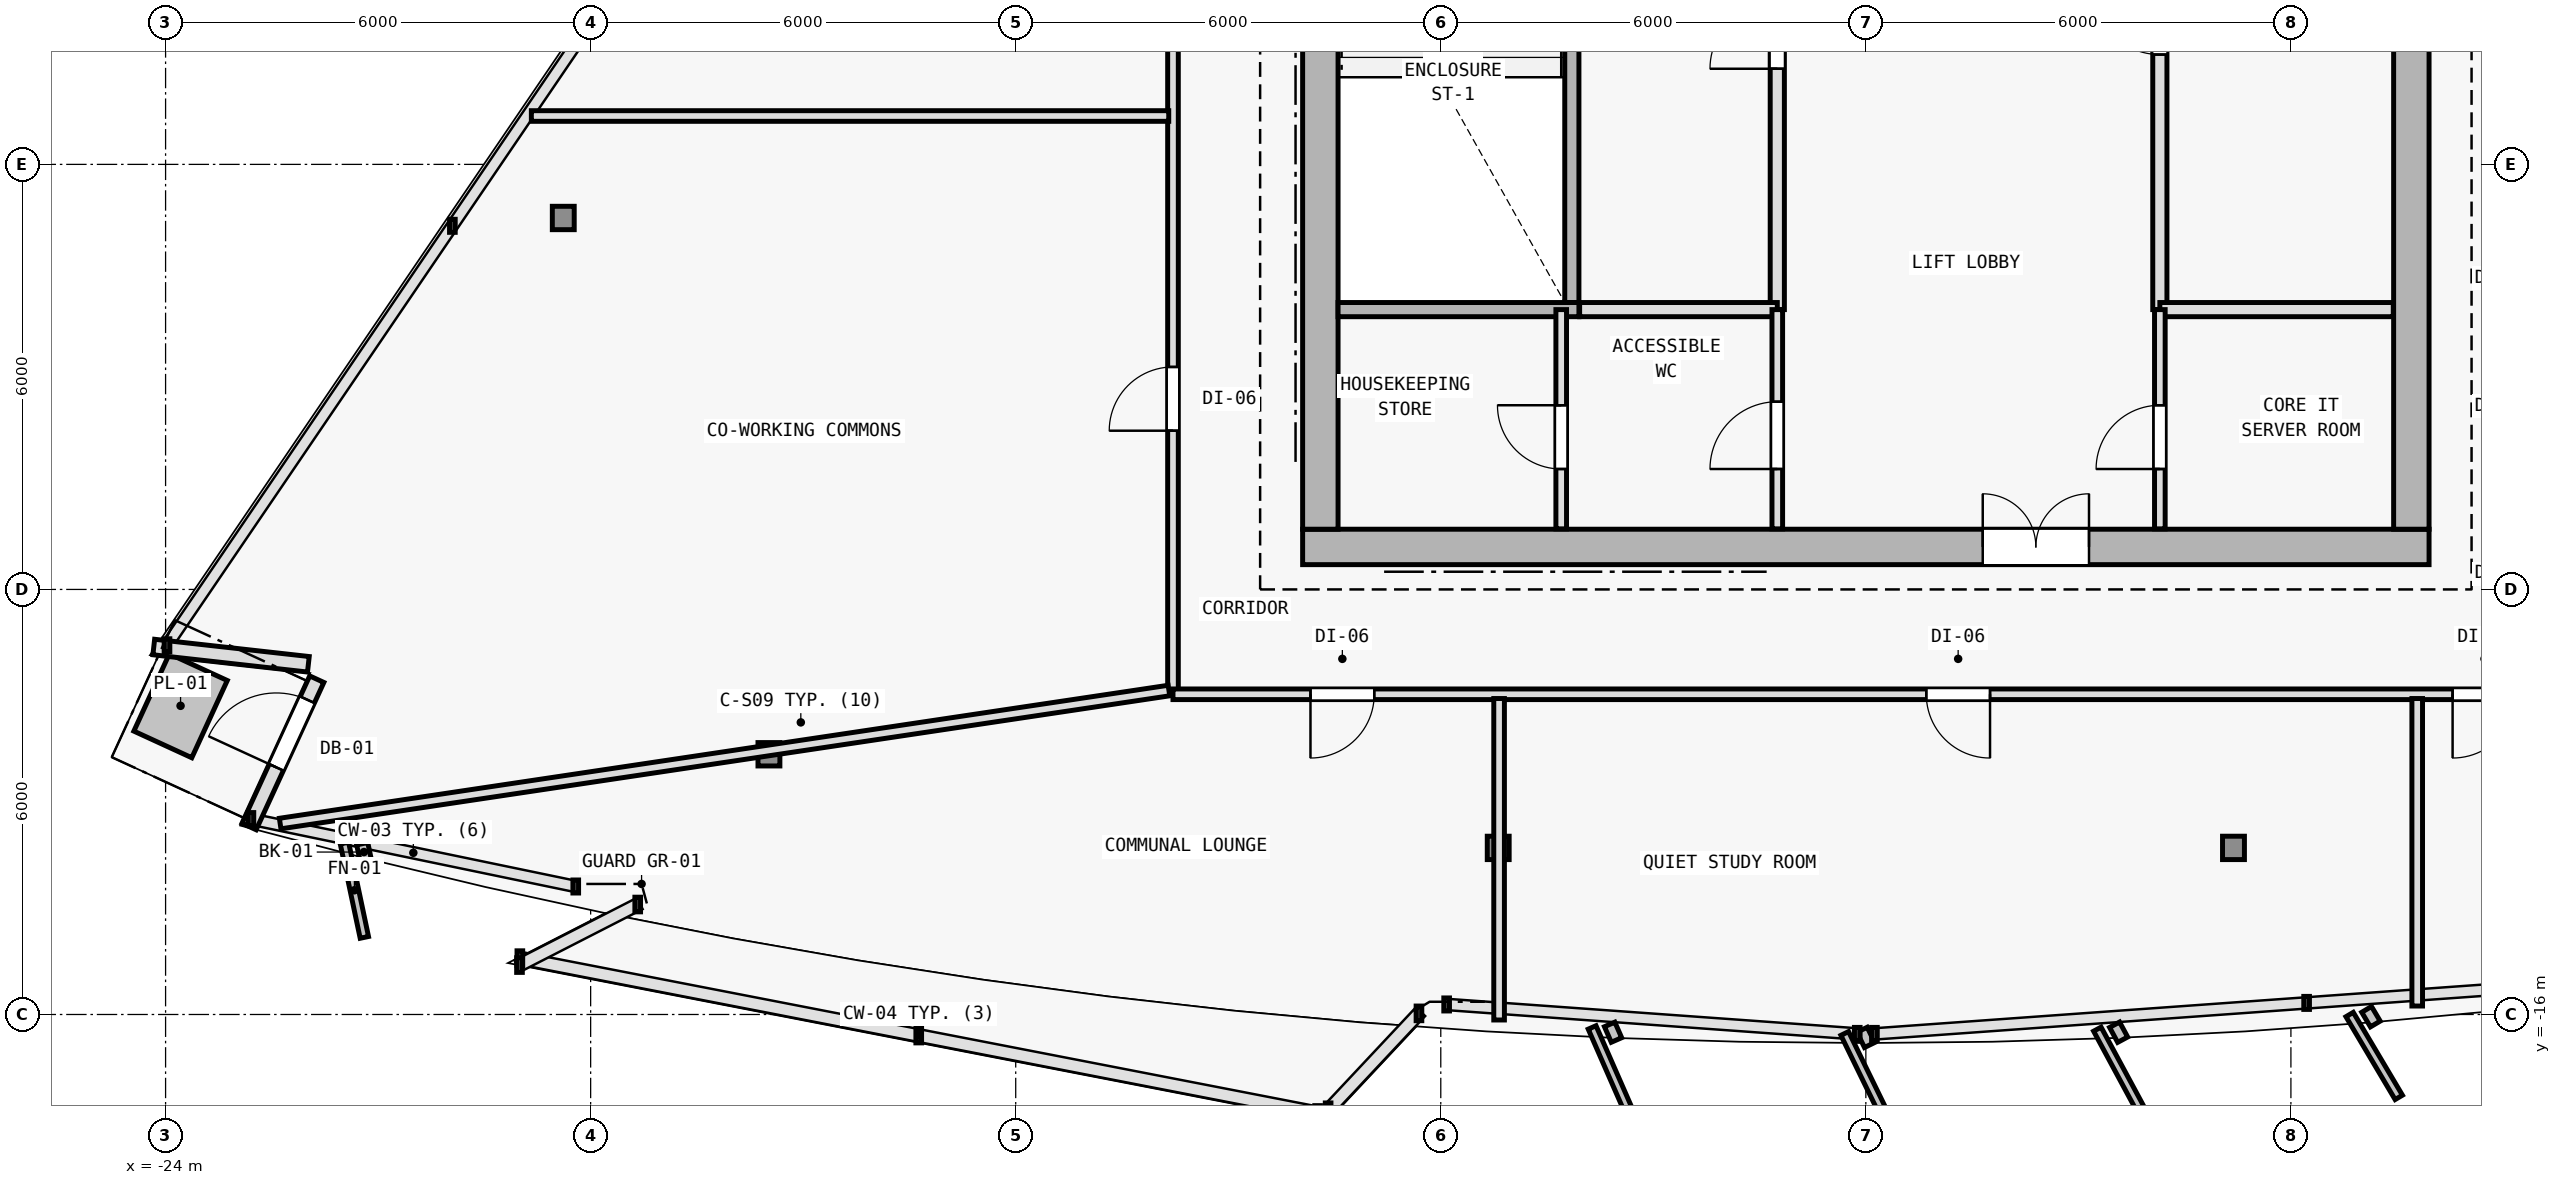
"""IFC4 building model, lengths in metres.
Left out: names, types, materials, properties, quantities, classifications, styles, units other than length and angle.
Written with IfcOpenShell. Run it as: python <this file> out.ifc"""

import sys

from ifc_helpers import new_model, si_unit, direction, frame, frame_2d, origin, origin_2d, place, context, subcontext, project, spatial, rectangle, i_section, extrude, element, fill, save


model = new_model("IFC4")
c1 = context("Model", 3, precision=1e-05, world=origin(), true_north=direction((0.0, 1.0)))
c2 = subcontext(c1, "Body", "Model", "MODEL_VIEW")
j1 = project(units=[si_unit("LENGTHUNIT", "METRE"), si_unit("PLANEANGLEUNIT", "RADIAN")], contexts=[c1])
p1 = place(None, origin())
s1 = spatial("IfcSite", under=j1, at=p1, CompositionType="ELEMENT")
p2 = place(p1, origin())
s2 = spatial("IfcBuilding", under=s1, at=p2, CompositionType="ELEMENT")
p3 = place(p2, frame((0.0, 0.0, 272.4)))
s3 = spatial("IfcBuildingStorey", under=s2, at=p3, CompositionType="ELEMENT", Elevation=272.4)
for number, where, z_axis, x_axis in (
    (1, (-7.7, -9.4, 0.0), (0.0, 0.0, 1.0), (1.0, 0.0, 0.0)),
    (2, (7.7, -9.4, 0.0), (0.0, 0.0, 1.0), (1.0, 0.0, 0.0)),
    (3, (0.0, -9.4, 0.0), (0.0, 0.0, 1.0), (1.0, 0.0, 0.0)),
):
    element("IfcColumn", number, at=place(p3, frame(where, z_axis=z_axis, x_axis=x_axis)), inside=s3, PredefinedType="COLUMN", context=c2, shape_type="SweptSolid", body=[
        extrude(i_section(OverallWidth=0.374, OverallDepth=0.372, WebThickness=0.012, FlangeThickness=0.02, FilletRadius=0.015, at=origin_2d()), origin(), (0.0, 0.0, 1.0), 3.6),
    ])
p4 = place(p3, frame((-15.483, -12.327, 0.006), z_axis=(0.020596292833, 0.033511459955, 0.999226087917), x_axis=(-0.851954850327, 0.523615252838, 0.0)))
e4 = element("IfcColumn", 4, at=p4, inside=s3, PredefinedType="COLUMN", context=c2, shape_type="SweptSolid", body=[
    extrude(i_section(OverallWidth=0.309, OverallDepth=0.33, WebThickness=0.011, FlangeThickness=0.019, FilletRadius=0.027, at=origin_2d()), origin(), (0.0, 0.0, 1.0), 3.592),
])
for number, where, z_axis, x_axis in (
    (5, (-5.189, -13.648, 0.006), (0.007, 0.035, 0.999), (-0.982, 0.191, 0.0)),
    (6, (5.189, -13.648, 0.006), (-0.007, 0.035, 0.999), (-0.982, -0.191, 0.0)),
):
    element("IfcColumn", number, at=place(p3, frame(where, z_axis=z_axis, x_axis=x_axis)), inside=s3, PredefinedType="COLUMN", context=c2, shape_type="SweptSolid", body=[
        extrude(i_section(OverallWidth=0.309, OverallDepth=0.33, WebThickness=0.011, FlangeThickness=0.019, FilletRadius=0.027, at=origin_2d()), origin(), (0.0, 0.0, 1.0), 3.591),
    ])
p5 = place(p3, frame((-18.386, -4.757, 0.006), z_axis=(0.025224163578, 0.021620711639, 0.999447990843), x_axis=(-0.650791373456, 0.759256602365, 0.0)))
e7 = element("IfcColumn", 7, at=p5, inside=s3, PredefinedType="COLUMN", context=c2, shape_type="SweptSolid", body=[
    extrude(i_section(OverallWidth=0.309, OverallDepth=0.33, WebThickness=0.011, FlangeThickness=0.019, FilletRadius=0.027, at=origin_2d()), origin(), (0.0, 0.0, 1.0), 3.591),
])
p6 = place(p3, frame((-21.985, -11.057, 0.0), z_axis=(0.0, 0.0, 1.0), x_axis=(-0.993823926228, 0.110968480463, 0.0)))
e8 = element("IfcWall", 8, at=p6, inside=s3, PredefinedType="SOLIDWALL", context=c2, shape_type="SweptSolid", body=[
    extrude(rectangle(XDim=2.196, YDim=0.22, at=frame_2d((1.098, 0.0))), origin(), (0.0, 0.0, 1.0), 3.35),
])
p7 = place(p3, frame((-22.822, -13.347, 0.0), z_axis=(0.0, 0.0, 1.0), x_axis=(0.417447808253, 0.908700900949, 0.0)))
e9 = element("IfcWall", 9, at=p7, inside=s3, PredefinedType="SOLIDWALL", context=c2, shape_type="SweptSolid", body=[
    extrude(rectangle(XDim=2.289, YDim=0.22, at=frame_2d((1.145, 0.0))), origin(), (0.0, 0.0, 1.0), 3.35),
])
p8 = place(p7, frame((0.919, 0.0, 0.0)))
e10 = element("IfcOpeningElement", 10, at=p8, cuts=e9, PredefinedType="OPENING", context=c2, shape_type="SweptSolid", body=[
    extrude(rectangle(XDim=1.05, YDim=2.15, at=frame_2d((0.525, 1.075))), frame((0.0, 0.12, 0.0), z_axis=(0.0, -1.0, 0.0), x_axis=(1.0, 0.0, 0.0)), (0.0, 0.0, 1.0), 0.24),
])
p9 = place(p3, frame((-7.95, -9.4, 0.0), z_axis=(0.0, 0.0, 1.0), x_axis=(1.0, 0.0, 0.0)))
e11 = element("IfcWall", 11, at=p9, inside=s3, PredefinedType="SHEAR", context=c2, shape_type="SweptSolid", body=[
    extrude(rectangle(XDim=15.9, YDim=0.5, at=frame_2d((7.95, 0.0))), origin(), (0.0, 0.0, 1.0), 3.35),
])
p10 = place(p9, frame((9.6, 0.0, 0.0)))
e12 = element("IfcOpeningElement", 12, at=p10, cuts=e11, PredefinedType="OPENING", context=c2, shape_type="SweptSolid", body=[
    extrude(rectangle(XDim=1.5, YDim=2.2, at=frame_2d((0.75, 1.1))), frame((0.0, 0.26, 0.0), z_axis=(0.0, -1.0, 0.0), x_axis=(1.0, 0.0, 0.0)), (0.0, 0.0, 1.0), 0.52),
])
p11 = place(p3, frame((-7.7, -9.15, 0.0), z_axis=(0.0, 0.0, 1.0), x_axis=(0.0, 1.0, 0.0)))
e13 = element("IfcWall", 13, at=p11, inside=s3, PredefinedType="SHEAR", context=c2, shape_type="SweptSolid", body=[
    extrude(rectangle(XDim=19.1, YDim=0.5, at=frame_2d((9.55, 0.0))), origin(), (0.0, 0.0, 1.0), 3.35),
])
p12 = place(p11, frame((12.7, 0.0, 0.0)))
e14 = element("IfcOpeningElement", 14, at=p12, cuts=e13, PredefinedType="OPENING", context=c2, shape_type="SweptSolid", body=[
    extrude(rectangle(XDim=1.1, YDim=2.15, at=frame_2d((0.55, 1.075))), frame((0.0, 0.26, 0.0), z_axis=(0.0, -1.0, 0.0), x_axis=(1.0, 0.0, 0.0)), (0.0, 0.0, 1.0), 0.52),
])
p13 = place(p3, frame((7.7, 9.95, 0.0), z_axis=(0.0, 0.0, 1.0), x_axis=(0.0, -1.0, 0.0)))
e15 = element("IfcWall", 15, at=p13, inside=s3, PredefinedType="SHEAR", context=c2, shape_type="SweptSolid", body=[
    extrude(rectangle(XDim=19.1, YDim=0.5, at=frame_2d((9.55, 0.0))), origin(), (0.0, 0.0, 1.0), 3.35),
])
p14 = place(p3, frame((-4.15, -5.95, 0.0), z_axis=(0.0, 0.0, 1.0), x_axis=(0.0, 1.0, 0.0)))
e16 = element("IfcWall", 16, at=p14, inside=s3, PredefinedType="SOLIDWALL", context=c2, shape_type="SweptSolid", body=[
    extrude(rectangle(XDim=7.2, YDim=0.2, at=frame_2d((3.6, 0.0))), origin(), (0.0, 0.0, 1.0), 3.35),
])
p15 = place(p3, frame((4.15, -6.05, 0.0), z_axis=(0.0, 0.0, 1.0), x_axis=(0.0, 1.0, 0.0)))
e17 = element("IfcWall", 17, at=p15, inside=s3, PredefinedType="SOLIDWALL", context=c2, shape_type="SweptSolid", body=[
    extrude(rectangle(XDim=8.7, YDim=0.2, at=frame_2d((4.35, 0.0))), origin(), (0.0, 0.0, 1.0), 3.35),
])
p16 = place(p15, frame((3.6, 0.0, 0.0)))
e18 = element("IfcOpeningElement", 18, at=p16, cuts=e17, PredefinedType="OPENING", context=c2, shape_type="SweptSolid", body=[
    extrude(rectangle(XDim=0.95, YDim=2.1, at=frame_2d((0.475, 1.05))), frame((0.0, 0.11, 0.0), z_axis=(0.0, -1.0, 0.0), x_axis=(1.0, 0.0, 0.0)), (0.0, 0.0, 1.0), 0.22),
])
p17 = place(p3, frame((-1.25, -6.05, 0.0), z_axis=(0.0, 0.0, 1.0), x_axis=(0.0, 1.0, 0.0)))
e19 = element("IfcWall", 19, at=p17, inside=s3, PredefinedType="SOLIDWALL", context=c2, shape_type="SweptSolid", body=[
    extrude(rectangle(XDim=8.7, YDim=0.2, at=frame_2d((4.35, 0.0))), origin(), (0.0, 0.0, 1.0), 3.35),
])
p18 = place(p17, frame((3.4, 0.0, 0.0)))
e20 = element("IfcOpeningElement", 20, at=p18, cuts=e19, PredefinedType="OPENING", context=c2, shape_type="SweptSolid", body=[
    extrude(rectangle(XDim=0.95, YDim=2.1, at=frame_2d((0.475, 1.05))), frame((0.0, 0.11, 0.0), z_axis=(0.0, -1.0, 0.0), x_axis=(1.0, 0.0, 0.0)), (0.0, 0.0, 1.0), 0.22),
])
p19 = place(p3, frame((-7.45, -6.05, 0.0), z_axis=(0.0, 0.0, 1.0), x_axis=(1.0, 0.0, 0.0)))
e21 = element("IfcWall", 21, at=p19, inside=s3, PredefinedType="SOLIDWALL", context=c2, shape_type="SweptSolid", body=[
    extrude(rectangle(XDim=3.4, YDim=0.2, at=frame_2d((1.7, 0.0))), origin(), (0.0, 0.0, 1.0), 3.35),
])
p20 = place(p3, frame((-4.04, -6.05, 0.0), z_axis=(0.0, 0.0, 1.0), x_axis=(1.0, 0.0, 0.0)))
e22 = element("IfcWall", 22, at=p20, inside=s3, PredefinedType="SOLIDWALL", context=c2, shape_type="SweptSolid", body=[
    extrude(rectangle(XDim=2.79, YDim=0.2, at=frame_2d((1.395, 0.0))), origin(), (0.0, 0.0, 1.0), 3.35),
])
p21 = place(p3, frame((4.15, -6.05, 0.0), z_axis=(0.0, 0.0, 1.0), x_axis=(1.0, 0.0, 0.0)))
e23 = element("IfcWall", 23, at=p21, inside=s3, PredefinedType="SOLIDWALL", context=c2, shape_type="SweptSolid", body=[
    extrude(rectangle(XDim=3.295, YDim=0.2, at=frame_2d((1.647, 0.0))), origin(), (0.0, 0.0, 1.0), 3.35),
])
p22 = place(p3, frame((-1.25, -9.145, 0.0), z_axis=(0.0, 0.0, 1.0), x_axis=(0.0, 1.0, 0.0)))
e24 = element("IfcWall", 24, at=p22, inside=s3, PredefinedType="PARTITIONING", context=c2, shape_type="SweptSolid", body=[
    extrude(rectangle(XDim=3.095, YDim=0.15, at=frame_2d((1.547, 0.0))), origin(), (0.0, 0.0, 1.0), 3.35),
])
p23 = place(p22, frame((0.845, 0.0, 0.0)))
e25 = element("IfcOpeningElement", 25, at=p23, cuts=e24, PredefinedType="OPENING", context=c2, shape_type="SweptSolid", body=[
    extrude(rectangle(XDim=0.95, YDim=2.1, at=frame_2d((0.475, 1.05))), frame((0.0, 0.085, 0.0), z_axis=(0.0, -1.0, 0.0), x_axis=(1.0, 0.0, 0.0)), (0.0, 0.0, 1.0), 0.17),
])
p24 = place(p3, frame((4.15, -9.145, 0.0), z_axis=(0.0, 0.0, 1.0), x_axis=(0.0, 1.0, 0.0)))
e26 = element("IfcWall", 26, at=p24, inside=s3, PredefinedType="PARTITIONING", context=c2, shape_type="SweptSolid", body=[
    extrude(rectangle(XDim=3.095, YDim=0.15, at=frame_2d((1.547, 0.0))), origin(), (0.0, 0.0, 1.0), 3.35),
])
p25 = place(p24, frame((0.845, 0.0, 0.0)))
e27 = element("IfcOpeningElement", 27, at=p25, cuts=e26, PredefinedType="OPENING", context=c2, shape_type="SweptSolid", body=[
    extrude(rectangle(XDim=0.9, YDim=2.1, at=frame_2d((0.45, 1.05))), frame((0.0, 0.085, 0.0), z_axis=(0.0, -1.0, 0.0), x_axis=(1.0, 0.0, 0.0)), (0.0, 0.0, 1.0), 0.17),
])
p26 = place(p3, frame((-4.3, -9.145, 0.0), z_axis=(0.0, 0.0, 1.0), x_axis=(0.0, 1.0, 0.0)))
e28 = element("IfcWall", 28, at=p26, inside=s3, PredefinedType="PARTITIONING", context=c2, shape_type="SweptSolid", body=[
    extrude(rectangle(XDim=3.095, YDim=0.15, at=frame_2d((1.547, 0.0))), origin(), (0.0, 0.0, 1.0), 3.35),
])
p27 = place(p26, frame((0.845, 0.0, 0.0)))
e29 = element("IfcOpeningElement", 29, at=p27, cuts=e28, PredefinedType="OPENING", context=c2, shape_type="SweptSolid", body=[
    extrude(rectangle(XDim=0.9, YDim=2.1, at=frame_2d((0.45, 1.05))), frame((0.0, 0.085, 0.0), z_axis=(0.0, -1.0, 0.0), x_axis=(1.0, 0.0, 0.0)), (0.0, 0.0, 1.0), 0.17),
])
p28 = place(p3, frame((-9.78, -11.48, 0.0), z_axis=(0.0, 0.0, 1.0), x_axis=(0.0, 1.0, 0.0)))
e30 = element("IfcWall", 30, at=p28, inside=s3, PredefinedType="PARTITIONING", context=c2, shape_type="SweptSolid", body=[
    extrude(rectangle(XDim=19.706, YDim=0.15, at=frame_2d((9.853, 0.0))), origin(), (0.0, 0.0, 1.0), 2.725),
])
p29 = place(p28, frame((11.59, 0.0, 0.0)))
e31 = element("IfcOpeningElement", 31, at=p29, cuts=e30, PredefinedType="OPENING", context=c2, shape_type="SweptSolid", body=[
    extrude(rectangle(XDim=0.9, YDim=2.1, at=frame_2d((0.45, 1.05))), frame((0.0, 0.085, 0.0), z_axis=(0.0, -1.0, 0.0), x_axis=(1.0, 0.0, 0.0)), (0.0, 0.0, 1.0), 0.17),
])
p30 = place(p28, frame((3.721, 0.0, 0.0)))
e32 = element("IfcOpeningElement", 32, at=p30, cuts=e30, PredefinedType="OPENING", context=c2, shape_type="SweptSolid", body=[
    extrude(rectangle(XDim=0.9, YDim=2.1, at=frame_2d((0.45, 1.05))), frame((0.0, 0.085, 0.0), z_axis=(0.0, -1.0, 0.0), x_axis=(1.0, 0.0, 0.0)), (0.0, 0.0, 1.0), 0.17),
])
p31 = place(p3, frame((9.78, -11.48, 0.0), z_axis=(0.0, 0.0, 1.0), x_axis=(-1.0, 0.0, 0.0)))
e33 = element("IfcWall", 33, at=p31, inside=s3, PredefinedType="PARTITIONING", context=c2, shape_type="SweptSolid", body=[
    extrude(rectangle(XDim=19.56, YDim=0.15, at=frame_2d((9.78, 0.0))), origin(), (0.0, 0.0, 1.0), 2.775),
])
p32 = place(p31, frame((16.719, 0.0, 0.0)))
e34 = element("IfcOpeningElement", 34, at=p32, cuts=e33, PredefinedType="OPENING", context=c2, shape_type="SweptSolid", body=[
    extrude(rectangle(XDim=0.9, YDim=2.1, at=frame_2d((0.45, 1.05))), frame((0.0, 0.085, 0.0), z_axis=(0.0, -1.0, 0.0), x_axis=(1.0, 0.0, 0.0)), (0.0, 0.0, 1.0), 0.17),
])
p33 = place(p31, frame((8.027, 0.0, 0.0)))
e35 = element("IfcOpeningElement", 35, at=p33, cuts=e33, PredefinedType="OPENING", context=c2, shape_type="SweptSolid", body=[
    extrude(rectangle(XDim=0.9, YDim=2.1, at=frame_2d((0.45, 1.05))), frame((0.0, 0.085, 0.0), z_axis=(0.0, -1.0, 0.0), x_axis=(1.0, 0.0, 0.0)), (0.0, 0.0, 1.0), 0.17),
])
p34 = place(p31, frame((0.598, 0.0, 0.0)))
e36 = element("IfcOpeningElement", 36, at=p34, cuts=e33, PredefinedType="OPENING", context=c2, shape_type="SweptSolid", body=[
    extrude(rectangle(XDim=0.9, YDim=2.1, at=frame_2d((0.45, 1.05))), frame((0.0, 0.085, 0.0), z_axis=(0.0, -1.0, 0.0), x_axis=(1.0, 0.0, 0.0)), (0.0, 0.0, 1.0), 0.17),
])
p35 = place(p3, frame((-9.837, -11.427, 0.0), z_axis=(0.0, 0.0, 1.0), x_axis=(-0.988987677607, -0.147997883568, 0.0)))
e37 = element("IfcWall", 37, at=p35, inside=s3, PredefinedType="PARTITIONING", context=c2, shape_type="SweptSolid", body=[
    extrude(rectangle(XDim=12.686, YDim=0.15, at=frame_2d((6.343, 0.0))), origin(), (0.0, 0.0, 1.0), 2.775),
])
p36 = place(p3, frame((-5.177, -11.54, 0.0), z_axis=(0.0, 0.0, 1.0), x_axis=(0.0, -1.0, 0.0)))
e38 = element("IfcWall", 38, at=p36, inside=s3, PredefinedType="PARTITIONING", context=c2, shape_type="SweptSolid", body=[
    extrude(rectangle(XDim=4.538, YDim=0.15, at=frame_2d((2.269, 0.0))), origin(), (0.0, 0.0, 1.0), 2.775),
])
p37 = place(p3, frame((-9.84, -3.317, 0.0), z_axis=(0.0, 0.0, 1.0), x_axis=(-1.0, 0.0, 0.0)))
e39 = element("IfcWall", 39, at=p37, inside=s3, PredefinedType="PARTITIONING", context=c2, shape_type="SweptSolid", body=[
    extrude(rectangle(XDim=8.997, YDim=0.15, at=frame_2d((4.499, 0.0))), origin(), (0.0, 0.0, 1.0), 2.775),
])
p38 = place(p3, frame((7.783, -11.54, 0.0), z_axis=(0.0, 0.0, 1.0), x_axis=(0.0, -1.0, 0.0)))
e40 = element("IfcWall", 40, at=p38, inside=s3, PredefinedType="PARTITIONING", context=c2, shape_type="SweptSolid", body=[
    extrude(rectangle(XDim=4.341, YDim=0.15, at=frame_2d((2.17, 0.0))), origin(), (0.0, 0.0, 1.0), 2.925),
])
p39 = place(p8, origin())
e41 = element("IfcDoor", 41, at=p39, inside=s3, OperationType="SINGLE_SWING_LEFT", PredefinedType="DOOR", context=c2, shape_type="SweptSolid", body=[
    extrude(rectangle(XDim=1.05, YDim=2.15, at=frame_2d((0.525, 1.075))), frame((0.0, 0.025, 0.0), z_axis=(0.0, -1.0, 0.0), x_axis=(1.0, 0.0, 0.0)), (0.0, 0.0, 1.0), 0.05),
])
fill(e10, e41)
p40 = place(p10, origin())
e42 = element("IfcDoor", 42, at=p40, inside=s3, OperationType="DOUBLE_DOOR_SINGLE_SWING", PredefinedType="DOOR", context=c2, shape_type="SweptSolid", body=[
    extrude(rectangle(XDim=1.5, YDim=2.2, at=frame_2d((0.75, 1.1))), frame((0.0, 0.025, 0.0), z_axis=(0.0, -1.0, 0.0), x_axis=(1.0, 0.0, 0.0)), (0.0, 0.0, 1.0), 0.05),
])
fill(e12, e42)
p41 = place(p16, origin())
e43 = element("IfcDoor", 43, at=p41, inside=s3, OperationType="SINGLE_SWING_RIGHT", PredefinedType="DOOR", context=c2, shape_type="SweptSolid", body=[
    extrude(rectangle(XDim=0.95, YDim=2.1, at=frame_2d((0.475, 1.05))), frame((0.0, 0.025, 0.0), z_axis=(0.0, -1.0, 0.0), x_axis=(1.0, 0.0, 0.0)), (0.0, 0.0, 1.0), 0.05),
])
fill(e18, e43)
p42 = place(p18, origin())
e44 = element("IfcDoor", 44, at=p42, inside=s3, OperationType="SINGLE_SWING_LEFT", PredefinedType="DOOR", context=c2, shape_type="SweptSolid", body=[
    extrude(rectangle(XDim=0.95, YDim=2.1, at=frame_2d((0.475, 1.05))), frame((0.0, 0.025, 0.0), z_axis=(0.0, -1.0, 0.0), x_axis=(1.0, 0.0, 0.0)), (0.0, 0.0, 1.0), 0.05),
])
fill(e20, e44)
p43 = place(p23, origin())
e45 = element("IfcDoor", 45, at=p43, inside=s3, OperationType="SINGLE_SWING_LEFT", PredefinedType="DOOR", context=c2, shape_type="SweptSolid", body=[
    extrude(rectangle(XDim=0.95, YDim=2.1, at=frame_2d((0.475, 1.05))), frame((0.0, 0.025, 0.0), z_axis=(0.0, -1.0, 0.0), x_axis=(1.0, 0.0, 0.0)), (0.0, 0.0, 1.0), 0.05),
])
fill(e25, e45)
p44 = place(p27, origin())
e46 = element("IfcDoor", 46, at=p44, inside=s3, OperationType="SINGLE_SWING_RIGHT", PredefinedType="DOOR", context=c2, shape_type="SweptSolid", body=[
    extrude(rectangle(XDim=0.9, YDim=2.1, at=frame_2d((0.45, 1.05))), frame((0.0, 0.025, 0.0), z_axis=(0.0, -1.0, 0.0), x_axis=(1.0, 0.0, 0.0)), (0.0, 0.0, 1.0), 0.05),
])
fill(e29, e46)
p45 = place(p25, origin())
e47 = element("IfcDoor", 47, at=p45, inside=s3, OperationType="SINGLE_SWING_LEFT", PredefinedType="DOOR", context=c2, shape_type="SweptSolid", body=[
    extrude(rectangle(XDim=0.9, YDim=2.1, at=frame_2d((0.45, 1.05))), frame((0.0, 0.025, 0.0), z_axis=(0.0, -1.0, 0.0), x_axis=(1.0, 0.0, 0.0)), (0.0, 0.0, 1.0), 0.05),
])
fill(e27, e47)
p46 = place(p30, origin())
e48 = element("IfcDoor", 48, at=p46, inside=s3, OperationType="SINGLE_SWING_LEFT", PredefinedType="DOOR", context=c2, shape_type="SweptSolid", body=[
    extrude(rectangle(XDim=0.9, YDim=2.1, at=frame_2d((0.45, 1.05))), frame((0.0, 0.025, 0.0), z_axis=(0.0, -1.0, 0.0), x_axis=(1.0, 0.0, 0.0)), (0.0, 0.0, 1.0), 0.05),
])
fill(e32, e48)
p47 = place(p32, origin())
e49 = element("IfcDoor", 49, at=p47, inside=s3, OperationType="SINGLE_SWING_RIGHT", PredefinedType="DOOR", context=c2, shape_type="SweptSolid", body=[
    extrude(rectangle(XDim=0.9, YDim=2.1, at=frame_2d((0.45, 1.05))), frame((0.0, 0.025, 0.0), z_axis=(0.0, -1.0, 0.0), x_axis=(1.0, 0.0, 0.0)), (0.0, 0.0, 1.0), 0.05),
])
fill(e34, e49)
p48 = place(p33, origin())
e50 = element("IfcDoor", 50, at=p48, inside=s3, OperationType="SINGLE_SWING_LEFT", PredefinedType="DOOR", context=c2, shape_type="SweptSolid", body=[
    extrude(rectangle(XDim=0.9, YDim=2.1, at=frame_2d((0.45, 1.05))), frame((0.0, 0.025, 0.0), z_axis=(0.0, -1.0, 0.0), x_axis=(1.0, 0.0, 0.0)), (0.0, 0.0, 1.0), 0.05),
])
fill(e35, e50)
p49 = place(p34, origin())
e51 = element("IfcDoor", 51, at=p49, inside=s3, OperationType="SINGLE_SWING_RIGHT", PredefinedType="DOOR", context=c2, shape_type="SweptSolid", body=[
    extrude(rectangle(XDim=0.9, YDim=2.1, at=frame_2d((0.45, 1.05))), frame((0.0, 0.025, 0.0), z_axis=(0.0, -1.0, 0.0), x_axis=(1.0, 0.0, 0.0)), (0.0, 0.0, 1.0), 0.05),
])
fill(e36, e51)
save(model, sys.argv[1])
